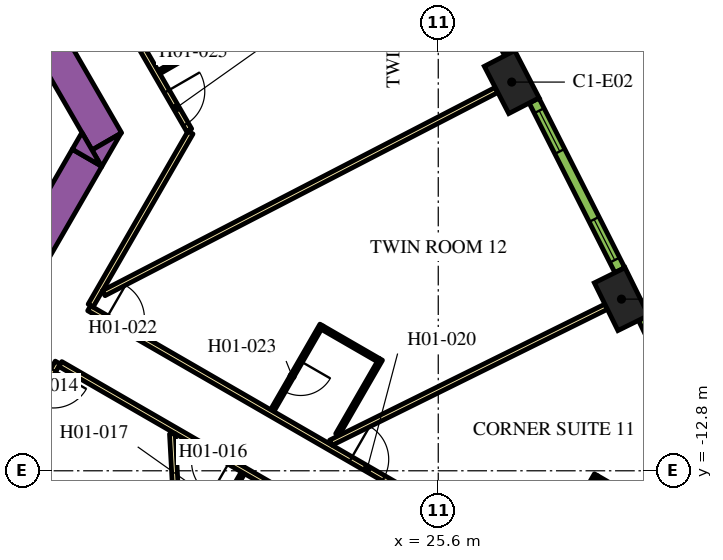
"""IFC4 building model, lengths in metres.
Left out: names, types, materials, properties, quantities, classifications, styles, units other than length and angle.
Written with IfcOpenShell. Run it as: python <this file> out.ifc"""

import sys

from ifc_helpers import new_model, si_unit, direction, frame, frame_2d, origin, origin_2d, place, context, subcontext, project, spatial, polyline, rectangle, outline, extrude, element, fill, save


model = new_model("IFC4")
c1 = context("Model", 3, precision=1e-05, world=origin(), true_north=direction((0.0, 1.0)))
c2 = subcontext(c1, "Body", "Model", "MODEL_VIEW")
j1 = project(units=[si_unit("LENGTHUNIT", "METRE"), si_unit("PLANEANGLEUNIT", "RADIAN")], contexts=[c1])
p1 = place(None, origin())
s1 = spatial("IfcSite", under=j1, at=p1, CompositionType="ELEMENT")
p2 = place(p1, origin())
s2 = spatial("IfcBuilding", under=s1, at=p2, CompositionType="ELEMENT")
p3 = place(p2, frame((0.0, 0.0, 27.6)))
s3 = spatial("IfcBuildingStorey", under=s2, at=p3, CompositionType="ELEMENT", Elevation=27.6)
for number, where, z_axis, x_axis in (
    (1, (30.421, -8.284, 0.0), (0.0, 0.0, 1.0), (-0.443, 0.897, 0.0)),
    (2, (27.533, -2.572, 0.0), (0.0, 0.0, 1.0), (-0.459, 0.888, 0.0)),
):
    element("IfcColumn", number, at=place(p3, frame(where, z_axis=z_axis, x_axis=x_axis)), inside=s3, PredefinedType="COLUMN", context=c2, shape_type="SweptSolid", body=[
        extrude(rectangle(XDim=1.4, YDim=0.9, at=origin_2d()), origin(), (0.0, 0.0, 1.0), 3.9),
    ])
p4 = place(p3, frame((6.776, 13.364, 0.0), z_axis=(0.0, 0.0, 1.0), x_axis=(0.500004177138, -0.8660229921, 0.0)))
e3 = element("IfcWall", 3, at=p4, inside=s3, PredefinedType="SOLIDWALL", context=c2, shape_type="SweptSolid", body=[
    extrude(rectangle(XDim=20.204, YDim=0.9, at=frame_2d((10.102, 0.0))), origin(), (0.0, 0.0, 1.0), 3.9),
])
p5 = place(p3, origin())
e4 = element("IfcWall", 4, at=p5, inside=s3, PredefinedType="SOLIDWALL", context=c2, shape_type="SweptSolid", body=[
    extrude(outline(polyline([(16.743, -4.8), (16.489, -4.36), (17.251, -3.92), (16.743, -4.8)])), origin(), (0.0, 0.0, 1.0), 3.9),
])
p6 = place(p3, frame((11.695, -12.644, 0.0), z_axis=(0.0, 0.0, 1.0), x_axis=(0.500010229568, 0.86601949766, 0.0)))
e5 = element("IfcWall", 5, at=p6, inside=s3, PredefinedType="SOLIDWALL", context=c2, shape_type="SweptSolid", body=[
    extrude(rectangle(XDim=9.326, YDim=0.9, at=frame_2d((4.663, 0.0))), origin(), (0.0, 0.0, 1.0), 3.9),
])
e6 = element("IfcWall", 6, at=p5, inside=s3, PredefinedType="SOLIDWALL", context=c2, shape_type="SweptSolid", body=[
    extrude(outline(polyline([(16.223, -3.9), (16.732, -4.78), (15.969, -4.34), (16.223, -3.9)])), origin(), (0.0, 0.0, 1.0), 3.9),
])
p7 = place(p3, frame((16.412, -8.523, 0.0), z_axis=(0.0, 0.0, 1.0), x_axis=(0.866022197818, -0.500005552856, 0.0)))
e7 = element("IfcWall", 7, at=p7, inside=s3, PredefinedType="PARTITIONING", context=c2, shape_type="SweptSolid", body=[
    extrude(rectangle(XDim=16.224, YDim=0.15, at=frame_2d((8.112, 0.0))), origin(), (0.0, 0.0, 1.0), 2.75),
])
p8 = place(p7, frame((7.949, 0.0, 0.0)))
e8 = element("IfcOpeningElement", 8, at=p8, cuts=e7, PredefinedType="OPENING", context=c2, shape_type="SweptSolid", body=[
    extrude(rectangle(XDim=1.0, YDim=2.1, at=frame_2d((0.5, 1.05))), frame((0.0, 0.085, 0.0), z_axis=(0.0, -1.0, 0.0), x_axis=(1.0, 0.0, 0.0)), (0.0, 0.0, 1.0), 0.17),
])
p9 = place(p7, frame((0.526, 0.0, 0.0)))
e9 = element("IfcOpeningElement", 9, at=p9, cuts=e7, PredefinedType="OPENING", context=c2, shape_type="SweptSolid", body=[
    extrude(rectangle(XDim=1.0, YDim=2.1, at=frame_2d((0.5, 1.05))), frame((0.0, 0.085, 0.0), z_axis=(0.0, -1.0, 0.0), x_axis=(1.0, 0.0, 0.0)), (0.0, 0.0, 1.0), 0.17),
])
p10 = place(p3, frame((19.081, -3.9, 0.0), z_axis=(0.0, 0.0, 1.0), x_axis=(-0.499974327079, -0.866040225545, 0.0)))
e10 = element("IfcWall", 10, at=p10, inside=s3, PredefinedType="PARTITIONING", context=c2, shape_type="SweptSolid", body=[
    extrude(rectangle(XDim=5.258, YDim=0.15, at=frame_2d((2.629, 0.0))), origin(), (0.0, 0.0, 1.0), 2.75),
])
p11 = place(p3, frame((6.163, 18.475, 0.0), z_axis=(0.0, 0.0, 1.0), x_axis=(0.500001317485, -0.866024643133, 0.0)))
e11 = element("IfcWall", 11, at=p11, inside=s3, PredefinedType="PARTITIONING", context=c2, shape_type="SweptSolid", body=[
    extrude(rectangle(XDim=25.767, YDim=0.15, at=frame_2d((12.883, 0.0))), origin(), (0.0, 0.0, 1.0), 2.75),
])
p12 = place(p11, frame((24.586, 0.0, 0.0)))
e12 = element("IfcOpeningElement", 12, at=p12, cuts=e11, PredefinedType="OPENING", context=c2, shape_type="SweptSolid", body=[
    extrude(rectangle(XDim=1.0, YDim=2.1, at=frame_2d((0.5, 1.05))), frame((0.0, 0.085, 0.0), z_axis=(0.0, -1.0, 0.0), x_axis=(1.0, 0.0, 0.0)), (0.0, 0.0, 1.0), 0.17),
])
p13 = place(p11, frame((19.319, 0.0, 0.0)))
e13 = element("IfcOpeningElement", 13, at=p13, cuts=e11, PredefinedType="OPENING", context=c2, shape_type="SweptSolid", body=[
    extrude(rectangle(XDim=1.0, YDim=2.1, at=frame_2d((0.5, 1.05))), frame((0.0, 0.085, 0.0), z_axis=(0.0, -1.0, 0.0), x_axis=(1.0, 0.0, 0.0)), (0.0, 0.0, 1.0), 0.17),
])
p14 = place(p11, frame((18.012, 0.0, 0.0)))
e14 = element("IfcOpeningElement", 14, at=p14, cuts=e11, PredefinedType="OPENING", context=c2, shape_type="SweptSolid", body=[
    extrude(rectangle(XDim=1.0, YDim=2.1, at=frame_2d((0.5, 1.05))), frame((0.0, 0.085, 0.0), z_axis=(0.0, -1.0, 0.0), x_axis=(1.0, 0.0, 0.0)), (0.0, 0.0, 1.0), 0.17),
])
p15 = place(p11, frame((6.824, 0.0, 0.0)))
e15 = element("IfcOpeningElement", 15, at=p15, cuts=e11, PredefinedType="OPENING", context=c2, shape_type="SweptSolid", body=[
    extrude(rectangle(XDim=1.1, YDim=2.1, at=frame_2d((0.55, 1.05))), frame((0.0, 0.085, 0.0), z_axis=(0.0, -1.0, 0.0), x_axis=(1.0, 0.0, 0.0)), (0.0, 0.0, 1.0), 0.17),
])
p16 = place(p11, frame((4.658, 0.0, 0.0)))
e16 = element("IfcOpeningElement", 16, at=p16, cuts=e11, PredefinedType="OPENING", context=c2, shape_type="SweptSolid", body=[
    extrude(rectangle(XDim=0.9, YDim=2.1, at=frame_2d((0.45, 1.05))), frame((0.0, 0.085, 0.0), z_axis=(0.0, -1.0, 0.0), x_axis=(1.0, 0.0, 0.0)), (0.0, 0.0, 1.0), 0.17),
])
p17 = place(p11, frame((0.18, 0.0, 0.0)))
e17 = element("IfcOpeningElement", 17, at=p17, cuts=e11, PredefinedType="OPENING", context=c2, shape_type="SweptSolid", body=[
    extrude(rectangle(XDim=1.0, YDim=2.1, at=frame_2d((0.5, 1.05))), frame((0.0, 0.085, 0.0), z_axis=(0.0, -1.0, 0.0), x_axis=(1.0, 0.0, 0.0)), (0.0, 0.0, 1.0), 0.17),
])
p18 = place(p3, frame((15.587, -9.952, 0.0), z_axis=(0.0, 0.0, 1.0), x_axis=(-0.500016618951, -0.866015808616, 0.0)))
e18 = element("IfcWall", 18, at=p18, inside=s3, PredefinedType="PARTITIONING", context=c2, shape_type="SweptSolid", body=[
    extrude(rectangle(XDim=5.268, YDim=0.15, at=frame_2d((2.634, 0.0))), origin(), (0.0, 0.0, 1.0), 2.75),
])
p19 = place(p18, frame((0.225, 0.0, 0.0)))
e19 = element("IfcOpeningElement", 19, at=p19, cuts=e18, PredefinedType="OPENING", context=c2, shape_type="SweptSolid", body=[
    extrude(rectangle(XDim=1.0, YDim=2.1, at=frame_2d((0.5, 1.05))), frame((0.0, 0.085, 0.0), z_axis=(0.0, -1.0, 0.0), x_axis=(1.0, 0.0, 0.0)), (0.0, 0.0, 1.0), 0.17),
])
p20 = place(p3, frame((29.638, -18.064, 0.0), z_axis=(0.0, 0.0, 1.0), x_axis=(-0.866026175601, 0.499998663172, 0.0)))
e20 = element("IfcWall", 20, at=p20, inside=s3, PredefinedType="PARTITIONING", context=c2, shape_type="SweptSolid", body=[
    extrude(rectangle(XDim=16.144, YDim=0.15, at=frame_2d((8.072, 0.0))), origin(), (0.0, 0.0, 1.0), 2.75),
])
p21 = place(p20, frame((11.004, 0.0, 0.0)))
e21 = element("IfcOpeningElement", 21, at=p21, cuts=e20, PredefinedType="OPENING", context=c2, shape_type="SweptSolid", body=[
    extrude(rectangle(XDim=1.0, YDim=2.1, at=frame_2d((0.5, 1.05))), frame((0.0, 0.085, 0.0), z_axis=(0.0, -1.0, 0.0), x_axis=(1.0, 0.0, 0.0)), (0.0, 0.0, 1.0), 0.17),
])
p22 = place(p20, frame((7.275, 0.0, 0.0)))
e22 = element("IfcOpeningElement", 22, at=p22, cuts=e20, PredefinedType="OPENING", context=c2, shape_type="SweptSolid", body=[
    extrude(rectangle(XDim=1.0, YDim=2.1, at=frame_2d((0.5, 1.05))), frame((0.0, 0.085, 0.0), z_axis=(0.0, -1.0, 0.0), x_axis=(1.0, 0.0, 0.0)), (0.0, 0.0, 1.0), 0.17),
])
p23 = place(p3, frame((27.134, -2.779, 0.0), z_axis=(0.0, 0.0, 1.0), x_axis=(-0.8882049501, -0.459447457951, 0.0)))
e23 = element("IfcWall", 23, at=p23, inside=s3, PredefinedType="PARTITIONING", context=c2, shape_type="SweptSolid", body=[
    extrude(rectangle(XDim=11.638, YDim=0.15, at=frame_2d((5.819, 0.0))), origin(), (0.0, 0.0, 1.0), 2.75),
])
p24 = place(p3, frame((19.198, -22.541, 0.0), z_axis=(0.0, 0.0, 1.0), x_axis=(-0.055432210572, 0.99846245299, 0.0)))
e24 = element("IfcWall", 24, at=p24, inside=s3, PredefinedType="PARTITIONING", context=c2, shape_type="SweptSolid", body=[
    extrude(rectangle(XDim=10.729, YDim=0.15, at=frame_2d((5.365, 0.0))), origin(), (0.0, 0.0, 1.0), 2.75),
])
p25 = place(p3, frame((30.018, -8.483, 0.0), z_axis=(0.0, 0.0, 1.0), x_axis=(-0.896544505264, -0.44295366584, 0.0)))
e25 = element("IfcWall", 25, at=p25, inside=s3, PredefinedType="PARTITIONING", context=c2, shape_type="SweptSolid", body=[
    extrude(rectangle(XDim=8.079, YDim=0.15, at=frame_2d((4.04, 0.0))), origin(), (0.0, 0.0, 1.0), 2.75),
])
p26 = place(p3, frame((16.16, -14.31, 0.0), z_axis=(0.0, 0.0, 1.0), x_axis=(-0.866062058628, 0.499936506574, 0.0)))
e26 = element("IfcWall", 26, at=p26, inside=s3, PredefinedType="PARTITIONING", context=c2, shape_type="SweptSolid", body=[
    extrude(rectangle(XDim=2.6, YDim=0.1, at=frame_2d((1.3, 0.0))), origin(), (0.0, 0.0, 1.0), 2.75),
])
p27 = place(p26, frame((1.1, 0.0, 0.0)))
e27 = element("IfcOpeningElement", 27, at=p27, cuts=e26, PredefinedType="OPENING", context=c2, shape_type="SweptSolid", body=[
    extrude(rectangle(XDim=0.9, YDim=2.1, at=frame_2d((0.45, 1.05))), frame((0.0, 0.06, 0.0), z_axis=(0.0, -1.0, 0.0), x_axis=(1.0, 0.0, 0.0)), (0.0, 0.0, 1.0), 0.12),
])
p28 = place(p3, frame((20.461, -12.852, 0.0), z_axis=(0.0, 0.0, 1.0), x_axis=(-0.49997559174, -0.866039495442, 0.0)))
e28 = element("IfcWall", 28, at=p28, inside=s3, PredefinedType="PARTITIONING", context=c2, shape_type="SweptSolid", body=[
    extrude(rectangle(XDim=2.95, YDim=0.1, at=frame_2d((1.475, 0.0))), origin(), (0.0, 0.0, 1.0), 2.75),
])
p29 = place(p28, frame((0.6, 0.0, 0.0)))
e29 = element("IfcOpeningElement", 29, at=p29, cuts=e28, PredefinedType="OPENING", context=c2, shape_type="SweptSolid", body=[
    extrude(rectangle(XDim=0.9, YDim=2.1, at=frame_2d((0.45, 1.05))), frame((0.0, 0.06, 0.0), z_axis=(0.0, -1.0, 0.0), x_axis=(1.0, 0.0, 0.0)), (0.0, 0.0, 1.0), 0.12),
])
p30 = place(p3, frame((29.752, -12.905, 0.0), z_axis=(0.0, 0.0, 1.0), x_axis=(-0.500049511043, -0.865996816683, 0.0)))
e30 = element("IfcWall", 30, at=p30, inside=s3, PredefinedType="PARTITIONING", context=c2, shape_type="SweptSolid", body=[
    extrude(rectangle(XDim=2.8, YDim=0.1, at=frame_2d((1.4, 0.0))), origin(), (0.0, 0.0, 1.0), 2.75),
])
p31 = place(p30, frame((1.3, 0.0, 0.0)))
e31 = element("IfcOpeningElement", 31, at=p31, cuts=e30, PredefinedType="OPENING", context=c2, shape_type="SweptSolid", body=[
    extrude(rectangle(XDim=0.9, YDim=2.1, at=frame_2d((0.45, 1.05))), frame((0.0, 0.06, 0.0), z_axis=(0.0, -1.0, 0.0), x_axis=(1.0, 0.0, 0.0)), (0.0, 0.0, 1.0), 0.12),
])
p32 = place(p3, frame((29.771, -12.973, 0.0), z_axis=(0.0, 0.0, 1.0), x_axis=(0.865980596518, -0.500077600433, 0.0)))
e32 = element("IfcWall", 32, at=p32, inside=s3, PredefinedType="PARTITIONING", context=c2, shape_type="SweptSolid", body=[
    extrude(rectangle(XDim=2.4, YDim=0.1, at=frame_2d((1.2, 0.0))), origin(), (0.0, 0.0, 1.0), 2.75),
])
p33 = place(p3, frame((22.53, -8.966, 0.0), z_axis=(0.0, 0.0, 1.0), x_axis=(-0.500006934395, -0.866021400173, 0.0)))
e33 = element("IfcWall", 33, at=p33, inside=s3, PredefinedType="PARTITIONING", context=c2, shape_type="SweptSolid", body=[
    extrude(rectangle(XDim=2.6, YDim=0.1, at=frame_2d((1.3, 0.0))), origin(), (0.0, 0.0, 1.0), 2.75),
])
p34 = place(p33, frame((1.1, 0.0, 0.0)))
e34 = element("IfcOpeningElement", 34, at=p34, cuts=e33, PredefinedType="OPENING", context=c2, shape_type="SweptSolid", body=[
    extrude(rectangle(XDim=0.9, YDim=2.1, at=frame_2d((0.45, 1.05))), frame((0.0, 0.06, 0.0), z_axis=(0.0, -1.0, 0.0), x_axis=(1.0, 0.0, 0.0)), (0.0, 0.0, 1.0), 0.12),
])
p35 = place(p3, frame((22.549, -9.035, 0.0), z_axis=(0.0, 0.0, 1.0), x_axis=(0.86605165483, -0.499954529098, 0.0)))
e35 = element("IfcWall", 35, at=p35, inside=s3, PredefinedType="PARTITIONING", context=c2, shape_type="SweptSolid", body=[
    extrude(rectangle(XDim=1.7, YDim=0.1, at=frame_2d((0.85, 0.0))), origin(), (0.0, 0.0, 1.0), 2.75),
])
p36 = place(p3, frame((22.944, -11.85, 0.0), z_axis=(0.0, 0.0, 1.0), x_axis=(0.499968531483, 0.866043571379, 0.0)))
e36 = element("IfcWall", 36, at=p36, inside=s3, PredefinedType="PARTITIONING", context=c2, shape_type="SweptSolid", body=[
    extrude(rectangle(XDim=2.29, YDim=0.1, at=frame_2d((1.145, 0.0))), origin(), (0.0, 0.0, 1.0), 2.75),
])
p37 = place(p3, frame((18.25, -2.311, 0.0), z_axis=(0.0, 0.0, 1.0), x_axis=(0.866021400173, 0.500006934395, 0.0)))
e37 = element("IfcWall", 37, at=p37, inside=s3, PredefinedType="PARTITIONING", context=c2, shape_type="SweptSolid", body=[
    extrude(rectangle(XDim=2.6, YDim=0.1, at=frame_2d((1.3, 0.0))), origin(), (0.0, 0.0, 1.0), 2.75),
])
p38 = place(p37, frame((0.6, 0.0, 0.0)))
e38 = element("IfcOpeningElement", 38, at=p38, cuts=e37, PredefinedType="OPENING", context=c2, shape_type="SweptSolid", body=[
    extrude(rectangle(XDim=0.9, YDim=2.1, at=frame_2d((0.45, 1.05))), frame((0.0, 0.06, 0.0), z_axis=(0.0, -1.0, 0.0), x_axis=(1.0, 0.0, 0.0)), (0.0, 0.0, 1.0), 0.12),
])
p39 = place(p3, frame((33.176, -13.29, 0.0), z_axis=(0.0, 0.0, 1.0), x_axis=(-0.434664499056, 0.900592456808, 0.0)))
e39 = element("IfcWall", 39, at=p39, inside=s3, PredefinedType="SOLIDWALL", context=c2, shape_type="SweptSolid", body=[
    extrude(rectangle(XDim=5.006, YDim=0.29, at=frame_2d((2.503, 0.0))), origin(), (0.0, 0.0, 1.0), 3.65),
])
p40 = place(p39, frame((0.265, 0.0, 0.9)))
e40 = element("IfcOpeningElement", 40, at=p40, cuts=e39, PredefinedType="OPENING", context=c2, shape_type="SweptSolid", body=[
    extrude(rectangle(XDim=1.2, YDim=2.15, at=frame_2d((0.6, 1.075))), frame((0.0, 0.155, 0.0), z_axis=(0.0, -1.0, 0.0), x_axis=(1.0, 0.0, 0.0)), (0.0, 0.0, 1.0), 0.31),
])
p41 = place(p39, frame((3.496, 0.0, 0.9)))
e41 = element("IfcOpeningElement", 41, at=p41, cuts=e39, PredefinedType="OPENING", context=c2, shape_type="SweptSolid", body=[
    extrude(rectangle(XDim=1.2, YDim=2.15, at=frame_2d((0.6, 1.075))), frame((0.0, 0.155, 0.0), z_axis=(0.0, -1.0, 0.0), x_axis=(1.0, 0.0, 0.0)), (0.0, 0.0, 1.0), 0.31),
])
p42 = place(p3, frame((30.377, -7.521, 0.0), z_axis=(0.0, 0.0, 1.0), x_axis=(-0.451233929645, 0.892405704115, 0.0)))
e42 = element("IfcWall", 42, at=p42, inside=s3, PredefinedType="SOLIDWALL", context=c2, shape_type="SweptSolid", body=[
    extrude(rectangle(XDim=4.998, YDim=0.29, at=frame_2d((2.499, 0.0))), origin(), (0.0, 0.0, 1.0), 3.65),
])
p43 = place(p42, frame((0.297, 0.0, 0.9)))
e43 = element("IfcOpeningElement", 43, at=p43, cuts=e42, PredefinedType="OPENING", context=c2, shape_type="SweptSolid", body=[
    extrude(rectangle(XDim=1.2, YDim=2.15, at=frame_2d((0.6, 1.075))), frame((0.0, 0.155, 0.0), z_axis=(0.0, -1.0, 0.0), x_axis=(1.0, 0.0, 0.0)), (0.0, 0.0, 1.0), 0.31),
])
p44 = place(p42, frame((3.501, 0.0, 0.9)))
e44 = element("IfcOpeningElement", 44, at=p44, cuts=e42, PredefinedType="OPENING", context=c2, shape_type="SweptSolid", body=[
    extrude(rectangle(XDim=1.2, YDim=2.15, at=frame_2d((0.6, 1.075))), frame((0.0, 0.155, 0.0), z_axis=(0.0, -1.0, 0.0), x_axis=(1.0, 0.0, 0.0)), (0.0, 0.0, 1.0), 0.31),
])
p45 = place(p3, frame((27.475, -1.81, 0.0), z_axis=(0.0, 0.0, 1.0), x_axis=(-0.467629620899, 0.883924509026, 0.0)))
e45 = element("IfcWall", 45, at=p45, inside=s3, PredefinedType="SOLIDWALL", context=c2, shape_type="SweptSolid", body=[
    extrude(rectangle(XDim=4.998, YDim=0.29, at=frame_2d((2.499, 0.0))), origin(), (0.0, 0.0, 1.0), 3.65),
])
p46 = place(p45, frame((0.297, 0.0, 0.9)))
e46 = element("IfcOpeningElement", 46, at=p46, cuts=e45, PredefinedType="OPENING", context=c2, shape_type="SweptSolid", body=[
    extrude(rectangle(XDim=1.2, YDim=2.15, at=frame_2d((0.6, 1.075))), frame((0.0, 0.155, 0.0), z_axis=(0.0, -1.0, 0.0), x_axis=(1.0, 0.0, 0.0)), (0.0, 0.0, 1.0), 0.31),
])
p47 = place(p45, frame((3.501, 0.0, 0.9)))
e47 = element("IfcOpeningElement", 47, at=p47, cuts=e45, PredefinedType="OPENING", context=c2, shape_type="SweptSolid", body=[
    extrude(rectangle(XDim=1.2, YDim=2.15, at=frame_2d((0.6, 1.075))), frame((0.0, 0.155, 0.0), z_axis=(0.0, -1.0, 0.0), x_axis=(1.0, 0.0, 0.0)), (0.0, 0.0, 1.0), 0.31),
])
p48 = place(p19, origin())
e48 = element("IfcDoor", 48, at=p48, inside=s3, OperationType="SINGLE_SWING_LEFT", PredefinedType="DOOR", context=c2, shape_type="SweptSolid", body=[
    extrude(rectangle(XDim=1.0, YDim=2.1, at=frame_2d((0.5, 1.05))), frame((0.0, 0.025, 0.0), z_axis=(0.0, -1.0, 0.0), x_axis=(1.0, 0.0, 0.0)), (0.0, 0.0, 1.0), 0.05),
])
fill(e19, e48)
p49 = place(p21, origin())
e49 = element("IfcDoor", 49, at=p49, inside=s3, OperationType="SINGLE_SWING_RIGHT", PredefinedType="DOOR", context=c2, shape_type="SweptSolid", body=[
    extrude(rectangle(XDim=1.0, YDim=2.1, at=frame_2d((0.5, 1.05))), frame((0.0, 0.025, 0.0), z_axis=(0.0, -1.0, 0.0), x_axis=(1.0, 0.0, 0.0)), (0.0, 0.0, 1.0), 0.05),
])
fill(e21, e49)
p50 = place(p8, origin())
e50 = element("IfcDoor", 50, at=p50, inside=s3, OperationType="SINGLE_SWING_LEFT", PredefinedType="DOOR", context=c2, shape_type="SweptSolid", body=[
    extrude(rectangle(XDim=1.0, YDim=2.1, at=frame_2d((0.5, 1.05))), frame((0.0, 0.025, 0.0), z_axis=(0.0, -1.0, 0.0), x_axis=(1.0, 0.0, 0.0)), (0.0, 0.0, 1.0), 0.05),
])
fill(e8, e50)
p51 = place(p9, origin())
e51 = element("IfcDoor", 51, at=p51, inside=s3, OperationType="SINGLE_SWING_LEFT", PredefinedType="DOOR", context=c2, shape_type="SweptSolid", body=[
    extrude(rectangle(XDim=1.0, YDim=2.1, at=frame_2d((0.5, 1.05))), frame((0.0, 0.025, 0.0), z_axis=(0.0, -1.0, 0.0), x_axis=(1.0, 0.0, 0.0)), (0.0, 0.0, 1.0), 0.05),
])
fill(e9, e51)
p52 = place(p34, origin())
e52 = element("IfcDoor", 52, at=p52, inside=s3, OperationType="SINGLE_SWING_RIGHT", PredefinedType="DOOR", context=c2, shape_type="SweptSolid", body=[
    extrude(rectangle(XDim=0.9, YDim=2.1, at=frame_2d((0.45, 1.05))), frame((0.0, 0.025, 0.0), z_axis=(0.0, -1.0, 0.0), x_axis=(1.0, 0.0, 0.0)), (0.0, 0.0, 1.0), 0.05),
])
fill(e34, e52)
p53 = place(p12, origin())
e53 = element("IfcDoor", 53, at=p53, inside=s3, OperationType="SINGLE_SWING_RIGHT", PredefinedType="DOOR", context=c2, shape_type="SweptSolid", body=[
    extrude(rectangle(XDim=1.0, YDim=2.1, at=frame_2d((0.5, 1.05))), frame((0.0, 0.025, 0.0), z_axis=(0.0, -1.0, 0.0), x_axis=(1.0, 0.0, 0.0)), (0.0, 0.0, 1.0), 0.05),
])
fill(e12, e53)
p54 = place(p38, origin())
e54 = element("IfcDoor", 54, at=p54, inside=s3, OperationType="SINGLE_SWING_LEFT", PredefinedType="DOOR", context=c2, shape_type="SweptSolid", body=[
    extrude(rectangle(XDim=0.9, YDim=2.1, at=frame_2d((0.45, 1.05))), frame((0.0, 0.025, 0.0), z_axis=(0.0, -1.0, 0.0), x_axis=(1.0, 0.0, 0.0)), (0.0, 0.0, 1.0), 0.05),
])
fill(e38, e54)
p55 = place(p43, origin())
e55 = element("IfcWindow", 55, at=p55, inside=s3, PartitioningType="DOUBLE_PANEL_VERTICAL", PredefinedType="WINDOW", context=c2, shape_type="SweptSolid", body=[
    extrude(rectangle(XDim=1.2, YDim=2.15, at=frame_2d((0.6, 1.075))), frame((0.0, 0.015, 0.0), z_axis=(0.0, -1.0, 0.0), x_axis=(1.0, 0.0, 0.0)), (0.0, 0.0, 1.0), 0.06),
])
fill(e43, e55)
p56 = place(p44, origin())
e56 = element("IfcWindow", 56, at=p56, inside=s3, PartitioningType="DOUBLE_PANEL_VERTICAL", PredefinedType="WINDOW", context=c2, shape_type="SweptSolid", body=[
    extrude(rectangle(XDim=1.2, YDim=2.15, at=frame_2d((0.6, 1.075))), frame((0.0, 0.015, 0.0), z_axis=(0.0, -1.0, 0.0), x_axis=(1.0, 0.0, 0.0)), (0.0, 0.0, 1.0), 0.06),
])
fill(e44, e56)
save(model, sys.argv[1])
